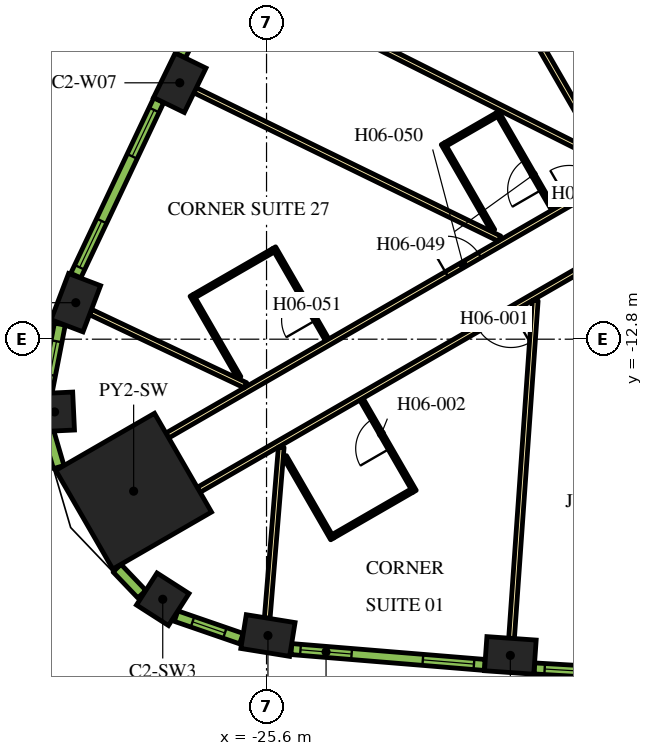
"""IFC4 building model, lengths in metres.
Left out: names, types, materials, properties, quantities, classifications, styles, units other than length and angle.
Written with IfcOpenShell. Run it as: python <this file> out.ifc"""

import sys

from ifc_helpers import new_model, si_unit, direction, frame, frame_2d, origin, origin_2d, place, context, subcontext, project, spatial, rectangle, extrude, element, fill, save


model = new_model("IFC4")
c1 = context("Model", 3, precision=1e-05, world=origin(), true_north=direction((0.0, 1.0)))
c2 = subcontext(c1, "Body", "Model", "MODEL_VIEW")
j1 = project(units=[si_unit("LENGTHUNIT", "METRE"), si_unit("PLANEANGLEUNIT", "RADIAN")], contexts=[c1])
p1 = place(None, origin())
s1 = spatial("IfcSite", under=j1, at=p1, CompositionType="ELEMENT")
p2 = place(p1, origin())
s2 = spatial("IfcBuilding", under=s1, at=p2, CompositionType="ELEMENT")
p3 = place(p2, frame((0.0, 0.0, 91.5)))
s3 = spatial("IfcBuildingStorey", under=s2, at=p3, CompositionType="ELEMENT", Elevation=91.5)
p4 = place(p3, frame((-29.097, -16.799, 0.0), z_axis=(0.0, 0.0, 1.0), x_axis=(-0.866025403784, -0.5, 0.0)))
e1 = element("IfcColumn", 1, at=p4, inside=s3, PredefinedType="COLUMN", context=c2, shape_type="SweptSolid", body=[
    extrude(rectangle(XDim=3.0, YDim=3.0, at=origin_2d()), origin(), (0.0, 0.0, 1.0), 3.9),
])
for number, where, z_axis, x_axis in (
    (2, (-25.563, -20.597, 0.0), (0.0, 0.0, 1.0), (0.987, -0.159, 0.0)),
    (3, (-19.184, -21.12, 0.0), (0.0, 0.0, 1.0), (0.998, -0.07, 0.0)),
    (4, (-27.883, -6.054, 0.0), (0.0, 0.0, 1.0), (-0.438, -0.899, 0.0)),
    (5, (-30.619, -11.839, 0.0), (0.0, 0.0, 1.0), (-0.355, -0.935, 0.0)),
):
    element("IfcColumn", number, at=place(p3, frame(where, z_axis=z_axis, x_axis=x_axis)), inside=s3, PredefinedType="COLUMN", context=c2, shape_type="SweptSolid", body=[
        extrude(rectangle(XDim=1.3, YDim=0.9, at=origin_2d()), origin(), (0.0, 0.0, 1.0), 3.9),
    ])
for number, where, z_axis, x_axis in (
    (6, (-31.177, -14.714, 0.0), (0.0, 0.0, 1.0), (0.047, -0.999, 0.0)),
    (7, (-28.331, -19.643, 0.0), (0.0, 0.0, 1.0), (0.842, -0.54, 0.0)),
):
    element("IfcColumn", number, at=place(p3, frame(where, z_axis=z_axis, x_axis=x_axis)), inside=s3, PredefinedType="COLUMN", context=c2, shape_type="SweptSolid", body=[
        extrude(rectangle(XDim=1.0, YDim=1.0, at=origin_2d()), origin(), (0.0, 0.0, 1.0), 3.9),
    ])
p5 = place(p3, frame((-16.412, -8.523, 0.0), z_axis=(0.0, 0.0, 1.0), x_axis=(-0.500001929737, 0.866024289647, 0.0)))
e8 = element("IfcWall", 8, at=p5, inside=s3, PredefinedType="PARTITIONING", context=c2, shape_type="SweptSolid", body=[
    extrude(rectangle(XDim=5.268, YDim=0.15, at=frame_2d((2.634, 0.0))), origin(), (0.0, 0.0, 1.0), 2.75),
])
p6 = place(p3, frame((-28.211, -15.335, 0.0), z_axis=(0.0, 0.0, 1.0), x_axis=(0.866025884867, 0.49999916674, 0.0)))
e9 = element("IfcWall", 9, at=p6, inside=s3, PredefinedType="PARTITIONING", context=c2, shape_type="SweptSolid", body=[
    extrude(rectangle(XDim=13.543, YDim=0.15, at=frame_2d((6.772, 0.0))), origin(), (0.0, 0.0, 1.0), 2.75),
])
p7 = place(p6, frame((12.214, 0.0, 0.0)))
e10 = element("IfcOpeningElement", 10, at=p7, cuts=e9, PredefinedType="OPENING", context=c2, shape_type="SweptSolid", body=[
    extrude(rectangle(XDim=1.0, YDim=2.1, at=frame_2d((0.5, 1.05))), frame((0.0, 0.085, 0.0), z_axis=(0.0, -1.0, 0.0), x_axis=(1.0, 0.0, 0.0)), (0.0, 0.0, 1.0), 0.17),
])
p8 = place(p6, frame((8.488, 0.0, 0.0)))
e11 = element("IfcOpeningElement", 11, at=p8, cuts=e9, PredefinedType="OPENING", context=c2, shape_type="SweptSolid", body=[
    extrude(rectangle(XDim=1.0, YDim=2.1, at=frame_2d((0.5, 1.05))), frame((0.0, 0.085, 0.0), z_axis=(0.0, -1.0, 0.0), x_axis=(1.0, 0.0, 0.0)), (0.0, 0.0, 1.0), 0.17),
])
p9 = place(p3, frame((-15.587, -9.952, 0.0), z_axis=(0.0, 0.0, 1.0), x_axis=(-0.866017869832, -0.500013048961, 0.0)))
e12 = element("IfcWall", 12, at=p9, inside=s3, PredefinedType="PARTITIONING", context=c2, shape_type="SweptSolid", body=[
    extrude(rectangle(XDim=13.624, YDim=0.15, at=frame_2d((6.812, 0.0))), origin(), (0.0, 0.0, 1.0), 2.75),
])
p10 = place(p9, frame((4.134, 0.0, 0.0)))
e13 = element("IfcOpeningElement", 13, at=p10, cuts=e12, PredefinedType="OPENING", context=c2, shape_type="SweptSolid", body=[
    extrude(rectangle(XDim=1.0, YDim=2.1, at=frame_2d((0.5, 1.05))), frame((0.0, 0.085, 0.0), z_axis=(0.0, -1.0, 0.0), x_axis=(1.0, 0.0, 0.0)), (0.0, 0.0, 1.0), 0.17),
])
p11 = place(p3, frame((-30.231, -12.085, 0.0), z_axis=(0.0, 0.0, 1.0), x_axis=(0.904001132572, -0.427530060122, 0.0)))
e14 = element("IfcWall", 14, at=p11, inside=s3, PredefinedType="PARTITIONING", context=c2, shape_type="SweptSolid", body=[
    extrude(rectangle(XDim=4.51, YDim=0.15, at=frame_2d((2.255, 0.0))), origin(), (0.0, 0.0, 1.0), 2.75),
])
p12 = place(p3, frame((-25.582, -20.138, 0.0), z_axis=(0.0, 0.0, 1.0), x_axis=(0.081746132986, 0.996653184283, 0.0)))
e15 = element("IfcWall", 15, at=p12, inside=s3, PredefinedType="PARTITIONING", context=c2, shape_type="SweptSolid", body=[
    extrude(rectangle(XDim=4.51, YDim=0.15, at=frame_2d((2.255, 0.0))), origin(), (0.0, 0.0, 1.0), 2.75),
])
p13 = place(p3, frame((-27.479, -6.251, 0.0), z_axis=(0.0, 0.0, 1.0), x_axis=(0.898945877276, -0.438059710231, 0.0)))
e16 = element("IfcWall", 16, at=p13, inside=s3, PredefinedType="PARTITIONING", context=c2, shape_type="SweptSolid", body=[
    extrude(rectangle(XDim=8.909, YDim=0.15, at=frame_2d((4.455, 0.0))), origin(), (0.0, 0.0, 1.0), 2.75),
])
p14 = place(p3, frame((-19.153, -20.671, 0.0), z_axis=(0.0, 0.0, 1.0), x_axis=(0.070070736723, 0.997542025107, 0.0)))
e17 = element("IfcWall", 17, at=p14, inside=s3, PredefinedType="PARTITIONING", context=c2, shape_type="SweptSolid", body=[
    extrude(rectangle(XDim=8.909, YDim=0.15, at=frame_2d((4.455, 0.0))), origin(), (0.0, 0.0, 1.0), 2.75),
])
p15 = place(p3, frame((-26.591, -3.122, 0.0), z_axis=(0.0, 0.0, 1.0), x_axis=(0.893766213273, -0.448533115847, 0.0)))
e18 = element("IfcWall", 18, at=p15, inside=s3, PredefinedType="PARTITIONING", context=c2, shape_type="SweptSolid", body=[
    extrude(rectangle(XDim=10.875, YDim=0.15, at=frame_2d((5.438, 0.0))), origin(), (0.0, 0.0, 1.0), 2.75),
])
p16 = place(p3, frame((-21.704, -16.803, 0.0), z_axis=(0.0, 0.0, 1.0), x_axis=(-0.500049511043, 0.865996816683, 0.0)))
e19 = element("IfcWall", 19, at=p16, inside=s3, PredefinedType="PARTITIONING", context=c2, shape_type="SweptSolid", body=[
    extrude(rectangle(XDim=2.8, YDim=0.1, at=frame_2d((1.4, 0.0))), origin(), (0.0, 0.0, 1.0), 2.75),
])
p17 = place(p16, frame((1.3, 0.0, 0.0)))
e20 = element("IfcOpeningElement", 20, at=p17, cuts=e19, PredefinedType="OPENING", context=c2, shape_type="SweptSolid", body=[
    extrude(rectangle(XDim=0.9, YDim=2.1, at=frame_2d((0.45, 1.05))), frame((0.0, 0.06, 0.0), z_axis=(0.0, -1.0, 0.0), x_axis=(1.0, 0.0, 0.0)), (0.0, 0.0, 1.0), 0.12),
])
p18 = place(p3, frame((-21.772, -16.785, 0.0), z_axis=(0.0, 0.0, 1.0), x_axis=(-0.866024647952, -0.500001309137, 0.0)))
e21 = element("IfcWall", 21, at=p18, inside=s3, PredefinedType="PARTITIONING", context=c2, shape_type="SweptSolid", body=[
    extrude(rectangle(XDim=2.4, YDim=0.1, at=frame_2d((1.2, 0.0))), origin(), (0.0, 0.0, 1.0), 2.75),
])
p19 = place(p3, frame((-25.119, -15.888, 0.0), z_axis=(0.0, 0.0, 1.0), x_axis=(0.500046524342, -0.865998541277, 0.0)))
e22 = element("IfcWall", 22, at=p19, inside=s3, PredefinedType="PARTITIONING", context=c2, shape_type="SweptSolid", body=[
    extrude(rectangle(XDim=2.5, YDim=0.1, at=frame_2d((1.25, 0.0))), origin(), (0.0, 0.0, 1.0), 2.75),
])
p20 = place(p3, frame((-18.055, -9.385, 0.0), z_axis=(0.0, 0.0, 1.0), x_axis=(-0.499939757307, 0.866060182126, 0.0)))
e23 = element("IfcWall", 23, at=p20, inside=s3, PredefinedType="PARTITIONING", context=c2, shape_type="SweptSolid", body=[
    extrude(rectangle(XDim=2.95, YDim=0.1, at=frame_2d((1.475, 0.0))), origin(), (0.0, 0.0, 1.0), 2.75),
])
p21 = place(p20, frame((0.6, 0.0, 0.0)))
e24 = element("IfcOpeningElement", 24, at=p21, cuts=e23, PredefinedType="OPENING", context=c2, shape_type="SweptSolid", body=[
    extrude(rectangle(XDim=0.9, YDim=2.1, at=frame_2d((0.45, 1.05))), frame((0.0, 0.06, 0.0), z_axis=(0.0, -1.0, 0.0), x_axis=(1.0, 0.0, 0.0)), (0.0, 0.0, 1.0), 0.12),
])
p22 = place(p3, frame((-19.549, -6.898, 0.0), z_axis=(0.0, 0.0, 1.0), x_axis=(-0.866043940782, -0.499967891604, 0.0)))
e25 = element("IfcWall", 25, at=p22, inside=s3, PredefinedType="PARTITIONING", context=c2, shape_type="SweptSolid", body=[
    extrude(rectangle(XDim=1.55, YDim=0.1, at=frame_2d((0.775, 0.0))), origin(), (0.0, 0.0, 1.0), 2.75),
])
p23 = place(p3, frame((-19.639, -9.941, 0.0), z_axis=(0.0, 0.0, 1.0), x_axis=(-0.499938597367, 0.866060851709, 0.0)))
e26 = element("IfcWall", 26, at=p23, inside=s3, PredefinedType="PARTITIONING", context=c2, shape_type="SweptSolid", body=[
    extrude(rectangle(XDim=2.64, YDim=0.1, at=frame_2d((1.32, 0.0))), origin(), (0.0, 0.0, 1.0), 2.75),
])
p24 = place(p3, frame((-24.004, -12.82, 0.0), z_axis=(0.0, 0.0, 1.0), x_axis=(-0.500011755427, 0.866018616679, 0.0)))
e27 = element("IfcWall", 27, at=p24, inside=s3, PredefinedType="PARTITIONING", context=c2, shape_type="SweptSolid", body=[
    extrude(rectangle(XDim=2.8, YDim=0.1, at=frame_2d((1.4, 0.0))), origin(), (0.0, 0.0, 1.0), 2.75),
])
p25 = place(p24, frame((0.6, 0.0, 0.0)))
e28 = element("IfcOpeningElement", 28, at=p25, cuts=e27, PredefinedType="OPENING", context=c2, shape_type="SweptSolid", body=[
    extrude(rectangle(XDim=0.9, YDim=2.1, at=frame_2d((0.45, 1.05))), frame((0.0, 0.06, 0.0), z_axis=(0.0, -1.0, 0.0), x_axis=(1.0, 0.0, 0.0)), (0.0, 0.0, 1.0), 0.12),
])
p26 = place(p3, frame((-25.422, -10.463, 0.0), z_axis=(0.0, 0.0, 1.0), x_axis=(-0.866024647952, -0.500001309137, 0.0)))
e29 = element("IfcWall", 29, at=p26, inside=s3, PredefinedType="PARTITIONING", context=c2, shape_type="SweptSolid", body=[
    extrude(rectangle(XDim=2.4, YDim=0.1, at=frame_2d((1.2, 0.0))), origin(), (0.0, 0.0, 1.0), 2.75),
])
p27 = place(p3, frame((-26.319, -13.81, 0.0), z_axis=(0.0, 0.0, 1.0), x_axis=(-0.499961950354, 0.866047370643, 0.0)))
e30 = element("IfcWall", 30, at=p27, inside=s3, PredefinedType="PARTITIONING", context=c2, shape_type="SweptSolid", body=[
    extrude(rectangle(XDim=2.5, YDim=0.1, at=frame_2d((1.25, 0.0))), origin(), (0.0, 0.0, 1.0), 2.75),
])
p28 = place(p3, frame((-24.946, -20.954, 0.0), z_axis=(0.0, 0.0, 1.0), x_axis=(0.99665273362, -0.081751627308, 0.0)))
e31 = element("IfcWall", 31, at=p28, inside=s3, PredefinedType="SOLIDWALL", context=c2, shape_type="SweptSolid", body=[
    extrude(rectangle(XDim=5.107, YDim=0.29, at=frame_2d((2.553, 0.0))), origin(), (0.0, 0.0, 1.0), 3.65),
])
p29 = place(p28, frame((0.24, 0.0, 0.9)))
e32 = element("IfcOpeningElement", 32, at=p29, cuts=e31, PredefinedType="OPENING", context=c2, shape_type="SweptSolid", body=[
    extrude(rectangle(XDim=1.35, YDim=2.15, at=frame_2d((0.675, 1.075))), frame((0.0, 0.155, 0.0), z_axis=(0.0, -1.0, 0.0), x_axis=(1.0, 0.0, 0.0)), (0.0, 0.0, 1.0), 0.31),
])
p30 = place(p28, frame((3.471, 0.0, 0.9)))
e33 = element("IfcOpeningElement", 33, at=p30, cuts=e31, PredefinedType="OPENING", context=c2, shape_type="SweptSolid", body=[
    extrude(rectangle(XDim=1.35, YDim=2.15, at=frame_2d((0.675, 1.075))), frame((0.0, 0.155, 0.0), z_axis=(0.0, -1.0, 0.0), x_axis=(1.0, 0.0, 0.0)), (0.0, 0.0, 1.0), 0.31),
])
p31 = place(p3, frame((-18.553, -21.463, 0.0), z_axis=(0.0, 0.0, 1.0), x_axis=(0.998290511436, -0.058447025388, 0.0)))
e34 = element("IfcWall", 34, at=p31, inside=s3, PredefinedType="SOLIDWALL", context=c2, shape_type="SweptSolid", body=[
    extrude(rectangle(XDim=5.1, YDim=0.29, at=frame_2d((2.55, 0.0))), origin(), (0.0, 0.0, 1.0), 3.65),
])
p32 = place(p31, frame((0.273, 0.0, 0.9)))
e35 = element("IfcOpeningElement", 35, at=p32, cuts=e34, PredefinedType="OPENING", context=c2, shape_type="SweptSolid", body=[
    extrude(rectangle(XDim=1.35, YDim=2.15, at=frame_2d((0.675, 1.075))), frame((0.0, 0.155, 0.0), z_axis=(0.0, -1.0, 0.0), x_axis=(1.0, 0.0, 0.0)), (0.0, 0.0, 1.0), 0.31),
])
p33 = place(p31, frame((3.478, 0.0, 0.9)))
e36 = element("IfcOpeningElement", 36, at=p33, cuts=e34, PredefinedType="OPENING", context=c2, shape_type="SweptSolid", body=[
    extrude(rectangle(XDim=1.35, YDim=2.15, at=frame_2d((0.675, 1.075))), frame((0.0, 0.155, 0.0), z_axis=(0.0, -1.0, 0.0), x_axis=(1.0, 0.0, 0.0)), (0.0, 0.0, 1.0), 0.31),
])
p34 = place(p3, frame((-25.576, -0.778, 0.0), z_axis=(0.0, 0.0, 1.0), x_axis=(-0.448534297211, -0.893765620409, 0.0)))
e37 = element("IfcWall", 37, at=p34, inside=s3, PredefinedType="SOLIDWALL", context=c2, shape_type="SweptSolid", body=[
    extrude(rectangle(XDim=5.1, YDim=0.29, at=frame_2d((2.55, 0.0))), origin(), (0.0, 0.0, 1.0), 3.65),
])
p35 = place(p34, frame((0.272, 0.0, 0.9)))
e38 = element("IfcOpeningElement", 38, at=p35, cuts=e37, PredefinedType="OPENING", context=c2, shape_type="SweptSolid", body=[
    extrude(rectangle(XDim=1.35, YDim=2.15, at=frame_2d((0.675, 1.075))), frame((0.0, 0.155, 0.0), z_axis=(0.0, -1.0, 0.0), x_axis=(1.0, 0.0, 0.0)), (0.0, 0.0, 1.0), 0.31),
])
p36 = place(p34, frame((3.478, 0.0, 0.9)))
e39 = element("IfcOpeningElement", 39, at=p36, cuts=e37, PredefinedType="OPENING", context=c2, shape_type="SweptSolid", body=[
    extrude(rectangle(XDim=1.35, YDim=2.15, at=frame_2d((0.675, 1.075))), frame((0.0, 0.155, 0.0), z_axis=(0.0, -1.0, 0.0), x_axis=(1.0, 0.0, 0.0)), (0.0, 0.0, 1.0), 0.31),
])
p37 = place(p3, frame((-28.436, -6.511, 0.0), z_axis=(0.0, 0.0, 1.0), x_axis=(-0.427543726596, -0.903994669148, 0.0)))
e40 = element("IfcWall", 40, at=p37, inside=s3, PredefinedType="SOLIDWALL", context=c2, shape_type="SweptSolid", body=[
    extrude(rectangle(XDim=5.107, YDim=0.29, at=frame_2d((2.553, 0.0))), origin(), (0.0, 0.0, 1.0), 3.65),
])
p38 = place(p37, frame((0.285, 0.0, 0.9)))
e41 = element("IfcOpeningElement", 41, at=p38, cuts=e40, PredefinedType="OPENING", context=c2, shape_type="SweptSolid", body=[
    extrude(rectangle(XDim=1.35, YDim=2.15, at=frame_2d((0.675, 1.075))), frame((0.0, 0.155, 0.0), z_axis=(0.0, -1.0, 0.0), x_axis=(1.0, 0.0, 0.0)), (0.0, 0.0, 1.0), 0.31),
])
p39 = place(p37, frame((3.516, 0.0, 0.9)))
e42 = element("IfcOpeningElement", 42, at=p39, cuts=e40, PredefinedType="OPENING", context=c2, shape_type="SweptSolid", body=[
    extrude(rectangle(XDim=1.35, YDim=2.15, at=frame_2d((0.675, 1.075))), frame((0.0, 0.155, 0.0), z_axis=(0.0, -1.0, 0.0), x_axis=(1.0, 0.0, 0.0)), (0.0, 0.0, 1.0), 0.31),
])
p40 = place(p3, frame((-31.039, -12.403, 0.0), z_axis=(0.0, 0.0, 1.0), x_axis=(-0.190409913989, -0.981704672829, 0.0)))
e43 = element("IfcWall", 43, at=p40, inside=s3, PredefinedType="SOLIDWALL", context=c2, shape_type="SweptSolid", body=[
    extrude(rectangle(XDim=1.819, YDim=0.29, at=frame_2d((0.91, 0.0))), origin(), (0.0, 0.0, 1.0), 3.65),
])
p41 = place(p40, frame((0.46, 0.0, 0.9)))
e44 = element("IfcOpeningElement", 44, at=p41, cuts=e43, PredefinedType="OPENING", context=c2, shape_type="SweptSolid", body=[
    extrude(rectangle(XDim=0.9, YDim=2.15, at=frame_2d((0.45, 1.075))), frame((0.0, 0.155, 0.0), z_axis=(0.0, -1.0, 0.0), x_axis=(1.0, 0.0, 0.0)), (0.0, 0.0, 1.0), 0.31),
])
p42 = place(p3, frame((-31.336, -15.256, 0.0), z_axis=(0.0, 0.0, 1.0), x_axis=(0.281454582132, -0.95957455062, 0.0)))
e45 = element("IfcWall", 45, at=p42, inside=s3, PredefinedType="SOLIDWALL", context=c2, shape_type="SweptSolid", body=[
    extrude(rectangle(XDim=0.947, YDim=0.29, at=frame_2d((0.474, 0.0))), origin(), (0.0, 0.0, 1.0), 3.65),
])
p43 = place(p3, frame((-29.534, -18.824, 0.0), z_axis=(0.0, 0.0, 1.0), x_axis=(0.690414427296, -0.723414071319, 0.0)))
e46 = element("IfcWall", 46, at=p43, inside=s3, PredefinedType="SOLIDWALL", context=c2, shape_type="SweptSolid", body=[
    extrude(rectangle(XDim=0.947, YDim=0.29, at=frame_2d((0.474, 0.0))), origin(), (0.0, 0.0, 1.0), 3.65),
])
p44 = place(p3, frame((-27.981, -20.086, 0.0), z_axis=(0.0, 0.0, 1.0), x_axis=(0.945385815453, -0.325953462844, 0.0)))
e47 = element("IfcWall", 47, at=p44, inside=s3, PredefinedType="SOLIDWALL", context=c2, shape_type="SweptSolid", body=[
    extrude(rectangle(XDim=1.819, YDim=0.29, at=frame_2d((0.91, 0.0))), origin(), (0.0, 0.0, 1.0), 3.65),
])
p45 = place(p44, frame((0.46, 0.0, 0.9)))
e48 = element("IfcOpeningElement", 48, at=p45, cuts=e47, PredefinedType="OPENING", context=c2, shape_type="SweptSolid", body=[
    extrude(rectangle(XDim=0.9, YDim=2.15, at=frame_2d((0.45, 1.075))), frame((0.0, 0.155, 0.0), z_axis=(0.0, -1.0, 0.0), x_axis=(1.0, 0.0, 0.0)), (0.0, 0.0, 1.0), 0.31),
])
p46 = place(p10, origin())
e49 = element("IfcDoor", 49, at=p46, inside=s3, OperationType="SINGLE_SWING_LEFT", PredefinedType="DOOR", context=c2, shape_type="SweptSolid", body=[
    extrude(rectangle(XDim=1.0, YDim=2.1, at=frame_2d((0.5, 1.05))), frame((0.0, 0.025, 0.0), z_axis=(0.0, -1.0, 0.0), x_axis=(1.0, 0.0, 0.0)), (0.0, 0.0, 1.0), 0.05),
])
fill(e13, e49)
p47 = place(p17, origin())
e50 = element("IfcDoor", 50, at=p47, inside=s3, OperationType="SINGLE_SWING_LEFT", PredefinedType="DOOR", context=c2, shape_type="SweptSolid", body=[
    extrude(rectangle(XDim=0.9, YDim=2.1, at=frame_2d((0.45, 1.05))), frame((0.0, 0.025, 0.0), z_axis=(0.0, -1.0, 0.0), x_axis=(1.0, 0.0, 0.0)), (0.0, 0.0, 1.0), 0.05),
])
fill(e20, e50)
p48 = place(p7, origin())
e51 = element("IfcDoor", 51, at=p48, inside=s3, OperationType="SINGLE_SWING_RIGHT", PredefinedType="DOOR", context=c2, shape_type="SweptSolid", body=[
    extrude(rectangle(XDim=1.0, YDim=2.1, at=frame_2d((0.5, 1.05))), frame((0.0, 0.025, 0.0), z_axis=(0.0, -1.0, 0.0), x_axis=(1.0, 0.0, 0.0)), (0.0, 0.0, 1.0), 0.05),
])
fill(e10, e51)
p49 = place(p21, origin())
e52 = element("IfcDoor", 52, at=p49, inside=s3, OperationType="SINGLE_SWING_LEFT", PredefinedType="DOOR", context=c2, shape_type="SweptSolid", body=[
    extrude(rectangle(XDim=0.9, YDim=2.1, at=frame_2d((0.45, 1.05))), frame((0.0, 0.025, 0.0), z_axis=(0.0, -1.0, 0.0), x_axis=(1.0, 0.0, 0.0)), (0.0, 0.0, 1.0), 0.05),
])
fill(e24, e52)
p50 = place(p8, origin())
e53 = element("IfcDoor", 53, at=p50, inside=s3, OperationType="SINGLE_SWING_RIGHT", PredefinedType="DOOR", context=c2, shape_type="SweptSolid", body=[
    extrude(rectangle(XDim=1.0, YDim=2.1, at=frame_2d((0.5, 1.05))), frame((0.0, 0.025, 0.0), z_axis=(0.0, -1.0, 0.0), x_axis=(1.0, 0.0, 0.0)), (0.0, 0.0, 1.0), 0.05),
])
fill(e11, e53)
p51 = place(p25, origin())
e54 = element("IfcDoor", 54, at=p51, inside=s3, OperationType="SINGLE_SWING_RIGHT", PredefinedType="DOOR", context=c2, shape_type="SweptSolid", body=[
    extrude(rectangle(XDim=0.9, YDim=2.1, at=frame_2d((0.45, 1.05))), frame((0.0, 0.025, 0.0), z_axis=(0.0, -1.0, 0.0), x_axis=(1.0, 0.0, 0.0)), (0.0, 0.0, 1.0), 0.05),
])
fill(e28, e54)
p52 = place(p29, origin())
e55 = element("IfcWindow", 55, at=p52, inside=s3, PartitioningType="DOUBLE_PANEL_VERTICAL", PredefinedType="WINDOW", context=c2, shape_type="SweptSolid", body=[
    extrude(rectangle(XDim=1.35, YDim=2.15, at=frame_2d((0.675, 1.075))), frame((0.0, 0.015, 0.0), z_axis=(0.0, -1.0, 0.0), x_axis=(1.0, 0.0, 0.0)), (0.0, 0.0, 1.0), 0.06),
])
fill(e32, e55)
p53 = place(p30, origin())
e56 = element("IfcWindow", 56, at=p53, inside=s3, PartitioningType="DOUBLE_PANEL_VERTICAL", PredefinedType="WINDOW", context=c2, shape_type="SweptSolid", body=[
    extrude(rectangle(XDim=1.35, YDim=2.15, at=frame_2d((0.675, 1.075))), frame((0.0, 0.015, 0.0), z_axis=(0.0, -1.0, 0.0), x_axis=(1.0, 0.0, 0.0)), (0.0, 0.0, 1.0), 0.06),
])
fill(e33, e56)
p54 = place(p32, origin())
e57 = element("IfcWindow", 57, at=p54, inside=s3, PartitioningType="DOUBLE_PANEL_VERTICAL", PredefinedType="WINDOW", context=c2, shape_type="SweptSolid", body=[
    extrude(rectangle(XDim=1.35, YDim=2.15, at=frame_2d((0.675, 1.075))), frame((0.0, 0.015, 0.0), z_axis=(0.0, -1.0, 0.0), x_axis=(1.0, 0.0, 0.0)), (0.0, 0.0, 1.0), 0.06),
])
fill(e35, e57)
p55 = place(p38, origin())
e58 = element("IfcWindow", 58, at=p55, inside=s3, PartitioningType="DOUBLE_PANEL_VERTICAL", PredefinedType="WINDOW", context=c2, shape_type="SweptSolid", body=[
    extrude(rectangle(XDim=1.35, YDim=2.15, at=frame_2d((0.675, 1.075))), frame((0.0, 0.015, 0.0), z_axis=(0.0, -1.0, 0.0), x_axis=(1.0, 0.0, 0.0)), (0.0, 0.0, 1.0), 0.06),
])
fill(e41, e58)
p56 = place(p39, origin())
e59 = element("IfcWindow", 59, at=p56, inside=s3, PartitioningType="DOUBLE_PANEL_VERTICAL", PredefinedType="WINDOW", context=c2, shape_type="SweptSolid", body=[
    extrude(rectangle(XDim=1.35, YDim=2.15, at=frame_2d((0.675, 1.075))), frame((0.0, 0.015, 0.0), z_axis=(0.0, -1.0, 0.0), x_axis=(1.0, 0.0, 0.0)), (0.0, 0.0, 1.0), 0.06),
])
fill(e42, e59)
p57 = place(p41, origin())
e60 = element("IfcWindow", 60, at=p57, inside=s3, PartitioningType="SINGLE_PANEL", PredefinedType="WINDOW", context=c2, shape_type="SweptSolid", body=[
    extrude(rectangle(XDim=0.9, YDim=2.15, at=frame_2d((0.45, 1.075))), frame((0.0, 0.015, 0.0), z_axis=(0.0, -1.0, 0.0), x_axis=(1.0, 0.0, 0.0)), (0.0, 0.0, 1.0), 0.06),
])
fill(e44, e60)
p58 = place(p45, origin())
e61 = element("IfcWindow", 61, at=p58, inside=s3, PartitioningType="SINGLE_PANEL", PredefinedType="WINDOW", context=c2, shape_type="SweptSolid", body=[
    extrude(rectangle(XDim=0.9, YDim=2.15, at=frame_2d((0.45, 1.075))), frame((0.0, 0.015, 0.0), z_axis=(0.0, -1.0, 0.0), x_axis=(1.0, 0.0, 0.0)), (0.0, 0.0, 1.0), 0.06),
])
fill(e48, e61)
save(model, sys.argv[1])
